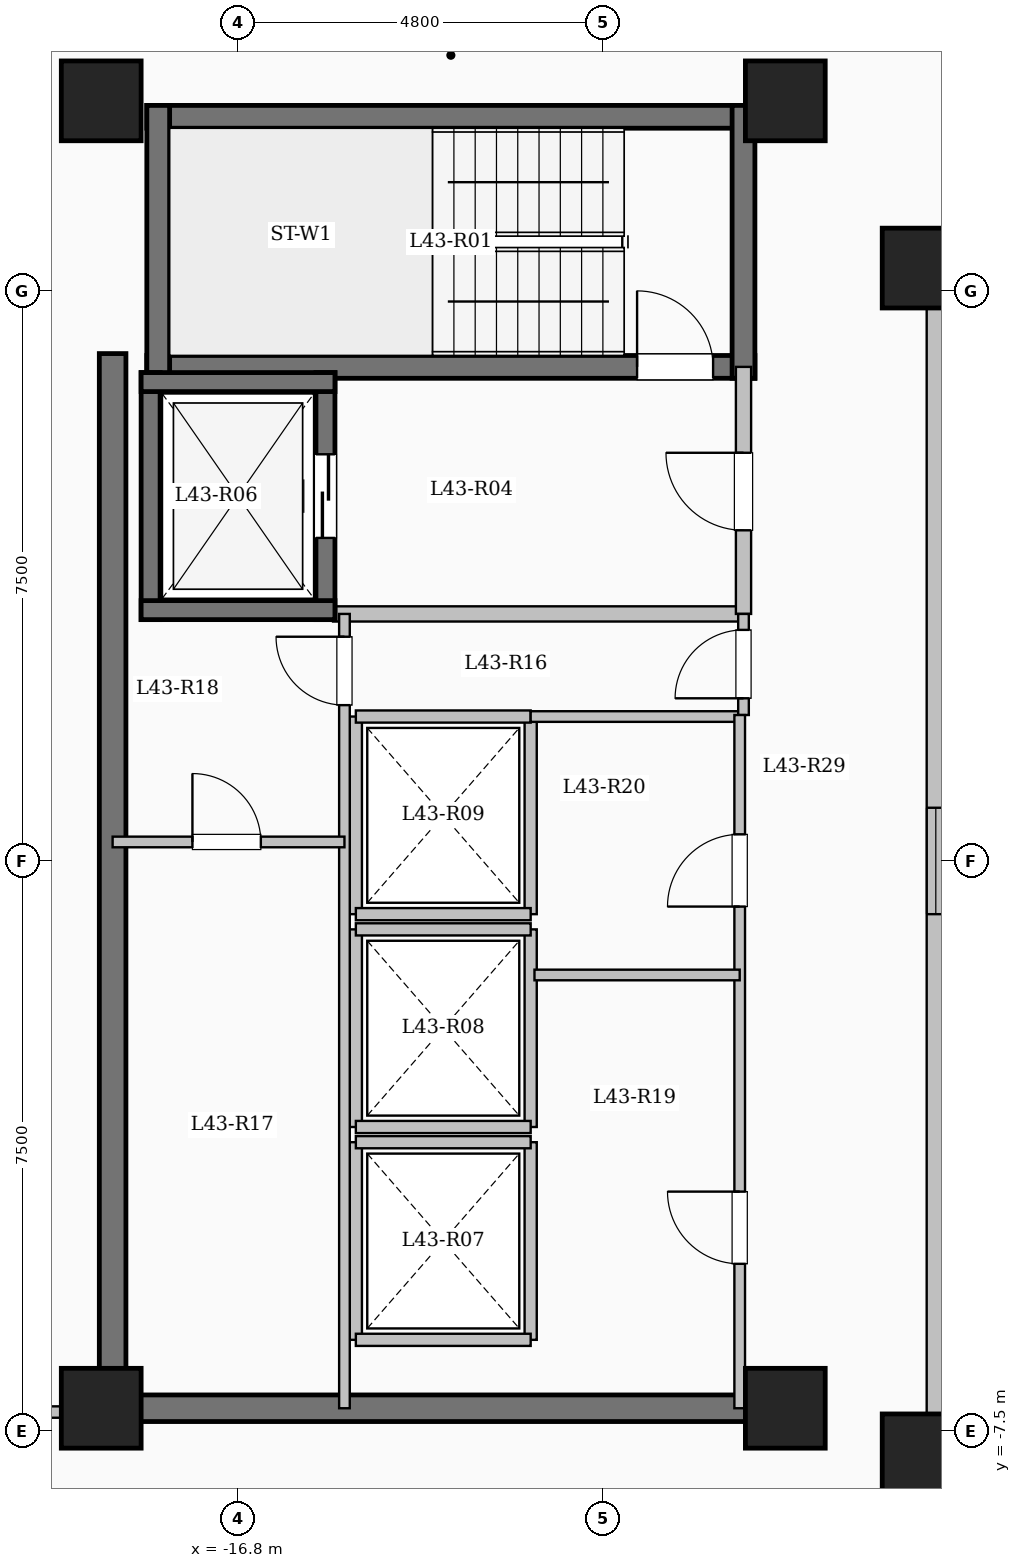
"""IFC4 building model, lengths in metres.
Left out: names, types, materials, properties, quantities, classifications, styles, units other than length and angle.
Written with IfcOpenShell. Run it as: python <this file> out.ifc"""

import sys

from ifc_helpers import new_model, si_unit, direction, frame, frame_2d, origin, origin_2d, place, context, subcontext, project, spatial, rectangle, extrude, element, fill, save


model = new_model("IFC4")
c1 = context("Model", 3, precision=1e-05, world=origin(), true_north=direction((0.0, 1.0)))
c2 = subcontext(c1, "Body", "Model", "MODEL_VIEW")
j1 = project(units=[si_unit("LENGTHUNIT", "METRE"), si_unit("PLANEANGLEUNIT", "RADIAN")], contexts=[c1])
p1 = place(None, origin())
s1 = spatial("IfcSite", under=j1, at=p1, CompositionType="ELEMENT")
p2 = place(p1, origin())
s2 = spatial("IfcBuilding", under=s1, at=p2, CompositionType="ELEMENT")
p3 = place(p2, frame((0.0, 0.0, 159.4)))
s3 = spatial("IfcBuildingStorey", under=s2, at=p3, CompositionType="ELEMENT", Elevation=159.4)
for number, where, z_axis, x_axis in (
    (1, (-7.8, -7.8, 0.0), (0.0, 0.0, 1.0), (1.0, 0.0, 0.0)),
    (2, (-7.8, 7.8, 0.0), (0.0, 0.0, 1.0), (1.0, 0.0, 0.0)),
    (3, (-9.6, -7.2, 0.0), (0.0, 0.0, 1.0), (1.0, 0.0, 0.0)),
    (4, (-9.6, 10.0, 0.0), (0.0, 0.0, 1.0), (1.0, 0.0, 0.0)),
    (5, (-18.6, -7.2, 0.0), (0.0, 0.0, 1.0), (1.0, 0.0, 0.0)),
    (6, (-18.6, 10.0, 0.0), (0.0, 0.0, 1.0), (1.0, 0.0, 0.0)),
):
    element("IfcColumn", number, at=place(p3, frame(where, z_axis=z_axis, x_axis=x_axis)), inside=s3, PredefinedType="COLUMN", context=c2, shape_type="SweptSolid", body=[
        extrude(rectangle(XDim=1.05, YDim=1.05, at=origin_2d()), origin(), (0.0, 0.0, 1.0), 3.35),
    ])
p4 = place(p3, frame((-7.62, -7.62, 0.0), z_axis=(0.0, 0.0, 1.0), x_axis=(1.0, 0.0, 0.0)))
e7 = element("IfcWall", 7, at=p4, inside=s3, PredefinedType="SOLIDWALL", context=c2, shape_type="SweptSolid", body=[
    extrude(rectangle(XDim=15.24, YDim=0.24, at=frame_2d((7.62, 0.0))), origin(), (0.0, 0.0, 1.0), 3.1),
])
p5 = place(p4, frame((6.92, 0.0, 0.95)))
e8 = element("IfcOpeningElement", 8, at=p5, cuts=e7, PredefinedType="OPENING", context=c2, shape_type="SweptSolid", body=[
    extrude(rectangle(XDim=1.4, YDim=1.5, at=frame_2d((0.7, 0.75))), frame((0.0, 0.13, 0.0), z_axis=(0.0, -1.0, 0.0), x_axis=(1.0, 0.0, 0.0)), (0.0, 0.0, 1.0), 0.26),
])
p6 = place(p3, frame((7.62, 7.62, 0.0), z_axis=(0.0, 0.0, 1.0), x_axis=(-1.0, 0.0, 0.0)))
e9 = element("IfcWall", 9, at=p6, inside=s3, PredefinedType="SOLIDWALL", context=c2, shape_type="SweptSolid", body=[
    extrude(rectangle(XDim=15.24, YDim=0.24, at=frame_2d((7.62, 0.0))), origin(), (0.0, 0.0, 1.0), 3.1),
])
p7 = place(p6, frame((6.92, 0.0, 0.95)))
e10 = element("IfcOpeningElement", 10, at=p7, cuts=e9, PredefinedType="OPENING", context=c2, shape_type="SweptSolid", body=[
    extrude(rectangle(XDim=1.4, YDim=1.5, at=frame_2d((0.7, 0.75))), frame((0.0, 0.13, 0.0), z_axis=(0.0, -1.0, 0.0), x_axis=(1.0, 0.0, 0.0)), (0.0, 0.0, 1.0), 0.26),
])
p8 = place(p3, frame((-7.62, 7.62, 0.0), z_axis=(0.0, 0.0, 1.0), x_axis=(0.0, -1.0, 0.0)))
e11 = element("IfcWall", 11, at=p8, inside=s3, PredefinedType="SOLIDWALL", context=c2, shape_type="SweptSolid", body=[
    extrude(rectangle(XDim=15.24, YDim=0.24, at=frame_2d((7.62, 0.0))), origin(), (0.0, 0.0, 1.0), 3.1),
])
p9 = place(p8, frame((6.92, 0.0, 0.95)))
e12 = element("IfcOpeningElement", 12, at=p9, cuts=e11, PredefinedType="OPENING", context=c2, shape_type="SweptSolid", body=[
    extrude(rectangle(XDim=1.4, YDim=1.5, at=frame_2d((0.7, 0.75))), frame((0.0, 0.13, 0.0), z_axis=(0.0, -1.0, 0.0), x_axis=(1.0, 0.0, 0.0)), (0.0, 0.0, 1.0), 0.26),
])
p10 = place(p3, frame((-18.0, 9.79, 0.0), z_axis=(0.0, 0.0, 1.0), x_axis=(1.0, 0.0, 0.0)))
e13 = element("IfcWall", 13, at=p10, inside=s3, PredefinedType="SHEAR", context=c2, shape_type="SweptSolid", body=[
    extrude(rectangle(XDim=8.0, YDim=0.3, at=frame_2d((4.0, 0.0))), origin(), (0.0, 0.0, 1.0), 3.35),
])
p11 = place(p3, frame((-18.0, 6.5, 0.0), z_axis=(0.0, 0.0, 1.0), x_axis=(1.0, 0.0, 0.0)))
e14 = element("IfcWall", 14, at=p11, inside=s3, PredefinedType="SHEAR", context=c2, shape_type="SweptSolid", body=[
    extrude(rectangle(XDim=8.0, YDim=0.3, at=frame_2d((4.0, 0.0))), origin(), (0.0, 0.0, 1.0), 3.35),
])
p12 = place(p11, frame((6.45, 0.0, 0.0)))
e15 = element("IfcOpeningElement", 15, at=p12, cuts=e14, PredefinedType="OPENING", context=c2, shape_type="SweptSolid", body=[
    extrude(rectangle(XDim=1.0, YDim=2.15, at=frame_2d((0.5, 1.075))), frame((0.0, 0.16, 0.0), z_axis=(0.0, -1.0, 0.0), x_axis=(1.0, 0.0, 0.0)), (0.0, 0.0, 1.0), 0.32),
])
for number, where, z_axis, x_axis in (
    (16, (-17.85, 6.35, 0.0), (0.0, 0.0, 1.0), (0.0, 1.0, 0.0)),
    (17, (-10.15, 6.35, 0.0), (0.0, 0.0, 1.0), (0.0, 1.0, 0.0)),
):
    element("IfcWall", number, at=place(p3, frame(where, z_axis=z_axis, x_axis=x_axis)), inside=s3, PredefinedType="SHEAR", context=c2, shape_type="SweptSolid", body=[
        extrude(rectangle(XDim=3.59, YDim=0.3, at=frame_2d((1.795, 0.0))), origin(), (0.0, 0.0, 1.0), 3.35),
    ])
p13 = place(p3, frame((-15.55, 3.25, 0.0), z_axis=(0.0, 0.0, 1.0), x_axis=(1.0, 0.0, 0.0)))
e18 = element("IfcWall", 18, at=p13, inside=s3, PredefinedType="SOLIDWALL", context=c2, shape_type="SweptSolid", body=[
    extrude(rectangle(XDim=5.4, YDim=0.2, at=frame_2d((2.7, 0.0))), origin(), (0.0, 0.0, 1.0), 3.1),
])
p14 = place(p3, frame((-10.15, 3.25, 0.0), z_axis=(0.0, 0.0, 1.0), x_axis=(0.0, 1.0, 0.0)))
e19 = element("IfcWall", 19, at=p14, inside=s3, PredefinedType="SOLIDWALL", context=c2, shape_type="SweptSolid", body=[
    extrude(rectangle(XDim=3.25, YDim=0.2, at=frame_2d((1.625, 0.0))), origin(), (0.0, 0.0, 1.0), 3.1),
])
p15 = place(p14, frame((1.1, 0.0, 0.0)))
e20 = element("IfcOpeningElement", 20, at=p15, cuts=e19, PredefinedType="OPENING", context=c2, shape_type="SweptSolid", body=[
    extrude(rectangle(XDim=1.02, YDim=2.15, at=frame_2d((0.51, 1.075))), frame((0.0, 0.11, 0.0), z_axis=(0.0, -1.0, 0.0), x_axis=(1.0, 0.0, 0.0)), (0.0, 0.0, 1.0), 0.22),
])
p16 = place(p3, frame((-17.95, 3.175, 0.0), z_axis=(0.0, 0.0, 1.0), x_axis=(0.0, 1.0, 0.0)))
e21 = element("IfcWall", 21, at=p16, inside=s3, PredefinedType="SHEAR", context=c2, shape_type="SweptSolid", body=[
    extrude(rectangle(XDim=3.25, YDim=0.25, at=frame_2d((1.625, 0.0))), origin(), (0.0, 0.0, 1.0), 3.35),
])
p17 = place(p3, frame((-15.65, 3.175, 0.0), z_axis=(0.0, 0.0, 1.0), x_axis=(0.0, 1.0, 0.0)))
e22 = element("IfcWall", 22, at=p17, inside=s3, PredefinedType="SHEAR", context=c2, shape_type="SweptSolid", body=[
    extrude(rectangle(XDim=3.25, YDim=0.25, at=frame_2d((1.625, 0.0))), origin(), (0.0, 0.0, 1.0), 3.35),
])
p18 = place(p17, frame((1.075, 0.0, 0.0)))
e23 = element("IfcOpeningElement", 23, at=p18, cuts=e22, PredefinedType="OPENING", context=c2, shape_type="SweptSolid", body=[
    extrude(rectangle(XDim=1.1, YDim=2.15, at=frame_2d((0.55, 1.075))), frame((0.0, 0.135, 0.0), z_axis=(0.0, -1.0, 0.0), x_axis=(1.0, 0.0, 0.0)), (0.0, 0.0, 1.0), 0.27),
])
for number, where, z_axis, x_axis in (
    (24, (-18.075, 3.3, 0.0), (0.0, 0.0, 1.0), (1.0, 0.0, 0.0)),
    (25, (-18.075, 6.3, 0.0), (0.0, 0.0, 1.0), (1.0, 0.0, 0.0)),
):
    element("IfcWall", number, at=place(p3, frame(where, z_axis=z_axis, x_axis=x_axis)), inside=s3, PredefinedType="SHEAR", context=c2, shape_type="SweptSolid", body=[
        extrude(rectangle(XDim=2.55, YDim=0.25, at=frame_2d((1.275, 0.0))), origin(), (0.0, 0.0, 1.0), 3.35),
    ])
for number, where, z_axis, x_axis in (
    (26, (-15.25, -6.3, 0.0), (0.0, 0.0, 1.0), (0.0, 1.0, 0.0)),
    (27, (-12.95, -6.3, 0.0), (0.0, 0.0, 1.0), (0.0, 1.0, 0.0)),
):
    element("IfcWall", number, at=place(p3, frame(where, z_axis=z_axis, x_axis=x_axis)), inside=s3, PredefinedType="SOLIDWALL", context=c2, shape_type="SweptSolid", body=[
        extrude(rectangle(XDim=2.6, YDim=0.16, at=frame_2d((1.3, 0.0))), origin(), (0.0, 0.0, 1.0), 3.1),
    ])
for number, where, z_axis, x_axis in (
    (28, (-15.25, -6.3, 0.0), (0.0, 0.0, 1.0), (1.0, 0.0, 0.0)),
    (29, (-15.25, -3.7, 0.0), (0.0, 0.0, 1.0), (1.0, 0.0, 0.0)),
):
    element("IfcWall", number, at=place(p3, frame(where, z_axis=z_axis, x_axis=x_axis)), inside=s3, PredefinedType="SOLIDWALL", context=c2, shape_type="SweptSolid", body=[
        extrude(rectangle(XDim=2.3, YDim=0.16, at=frame_2d((1.15, 0.0))), origin(), (0.0, 0.0, 1.0), 3.1),
    ])
for number, where, z_axis, x_axis in (
    (30, (-15.25, -3.5, 0.0), (0.0, 0.0, 1.0), (0.0, 1.0, 0.0)),
    (31, (-12.95, -3.5, 0.0), (0.0, 0.0, 1.0), (0.0, 1.0, 0.0)),
):
    element("IfcWall", number, at=place(p3, frame(where, z_axis=z_axis, x_axis=x_axis)), inside=s3, PredefinedType="SOLIDWALL", context=c2, shape_type="SweptSolid", body=[
        extrude(rectangle(XDim=2.6, YDim=0.16, at=frame_2d((1.3, 0.0))), origin(), (0.0, 0.0, 1.0), 3.1),
    ])
for number, where, z_axis, x_axis in (
    (32, (-15.25, -3.5, 0.0), (0.0, 0.0, 1.0), (1.0, 0.0, 0.0)),
    (33, (-15.25, -0.9, 0.0), (0.0, 0.0, 1.0), (1.0, 0.0, 0.0)),
):
    element("IfcWall", number, at=place(p3, frame(where, z_axis=z_axis, x_axis=x_axis)), inside=s3, PredefinedType="SOLIDWALL", context=c2, shape_type="SweptSolid", body=[
        extrude(rectangle(XDim=2.3, YDim=0.16, at=frame_2d((1.15, 0.0))), origin(), (0.0, 0.0, 1.0), 3.1),
    ])
for number, where, z_axis, x_axis in (
    (34, (-15.25, -0.7, 0.0), (0.0, 0.0, 1.0), (0.0, 1.0, 0.0)),
    (35, (-12.95, -0.7, 0.0), (0.0, 0.0, 1.0), (0.0, 1.0, 0.0)),
):
    element("IfcWall", number, at=place(p3, frame(where, z_axis=z_axis, x_axis=x_axis)), inside=s3, PredefinedType="SOLIDWALL", context=c2, shape_type="SweptSolid", body=[
        extrude(rectangle(XDim=2.6, YDim=0.16, at=frame_2d((1.3, 0.0))), origin(), (0.0, 0.0, 1.0), 3.1),
    ])
for number, where, z_axis, x_axis in (
    (36, (-15.25, -0.7, 0.0), (0.0, 0.0, 1.0), (1.0, 0.0, 0.0)),
    (37, (-15.25, 1.9, 0.0), (0.0, 0.0, 1.0), (1.0, 0.0, 0.0)),
):
    element("IfcWall", number, at=place(p3, frame(where, z_axis=z_axis, x_axis=x_axis)), inside=s3, PredefinedType="SOLIDWALL", context=c2, shape_type="SweptSolid", body=[
        extrude(rectangle(XDim=2.3, YDim=0.16, at=frame_2d((1.15, 0.0))), origin(), (0.0, 0.0, 1.0), 3.1),
    ])
p19 = place(p3, frame((-18.45, -7.375, 0.0), z_axis=(0.0, 0.0, 1.0), x_axis=(0.0, 1.0, 0.0)))
e38 = element("IfcWall", 38, at=p19, inside=s3, PredefinedType="SHEAR", context=c2, shape_type="SweptSolid", body=[
    extrude(rectangle(XDim=14.05, YDim=0.35, at=frame_2d((7.025, 0.0))), origin(), (0.0, 0.0, 1.0), 3.35),
])
p20 = place(p3, frame((-18.625, -7.2, 0.0), z_axis=(0.0, 0.0, 1.0), x_axis=(1.0, 0.0, 0.0)))
e39 = element("IfcWall", 39, at=p20, inside=s3, PredefinedType="SHEAR", context=c2, shape_type="SweptSolid", body=[
    extrude(rectangle(XDim=8.55, YDim=0.35, at=frame_2d((4.275, 0.0))), origin(), (0.0, 0.0, 1.0), 3.35),
])
p21 = place(p3, frame((-12.95, 1.9, 0.0), z_axis=(0.0, 0.0, 1.0), x_axis=(1.0, 0.0, 0.0)))
e40 = element("IfcWall", 40, at=p21, inside=s3, PredefinedType="PARTITIONING", context=c2, shape_type="SweptSolid", body=[
    extrude(rectangle(XDim=2.8, YDim=0.14, at=frame_2d((1.4, 0.0))), origin(), (0.0, 0.0, 1.0), 3.1),
])
p22 = place(p3, frame((-10.15, 1.92, 0.0), z_axis=(0.0, 0.0, 1.0), x_axis=(0.0, 1.0, 0.0)))
e41 = element("IfcWall", 41, at=p22, inside=s3, PredefinedType="PARTITIONING", context=c2, shape_type="SweptSolid", body=[
    extrude(rectangle(XDim=1.33, YDim=0.14, at=frame_2d((0.665, 0.0))), origin(), (0.0, 0.0, 1.0), 3.1),
])
p23 = place(p22, frame((0.22, 0.0, 0.0)))
e42 = element("IfcOpeningElement", 42, at=p23, cuts=e41, PredefinedType="OPENING", context=c2, shape_type="SweptSolid", body=[
    extrude(rectangle(XDim=0.9, YDim=2.08, at=frame_2d((0.45, 1.04))), frame((0.0, 0.08, 0.0), z_axis=(0.0, -1.0, 0.0), x_axis=(1.0, 0.0, 0.0)), (0.0, 0.0, 1.0), 0.16),
])
p24 = place(p3, frame((-15.4, -7.2, 0.0), z_axis=(0.0, 0.0, 1.0), x_axis=(0.0, 1.0, 0.0)))
e43 = element("IfcWall", 43, at=p24, inside=s3, PredefinedType="PARTITIONING", context=c2, shape_type="SweptSolid", body=[
    extrude(rectangle(XDim=10.45, YDim=0.14, at=frame_2d((5.225, 0.0))), origin(), (0.0, 0.0, 1.0), 3.1),
])
p25 = place(p24, frame((9.25, 0.0, 0.0)))
e44 = element("IfcOpeningElement", 44, at=p25, cuts=e43, PredefinedType="OPENING", context=c2, shape_type="SweptSolid", body=[
    extrude(rectangle(XDim=0.9, YDim=2.08, at=frame_2d((0.45, 1.04))), frame((0.0, 0.08, 0.0), z_axis=(0.0, -1.0, 0.0), x_axis=(1.0, 0.0, 0.0)), (0.0, 0.0, 1.0), 0.16),
])
p26 = place(p3, frame((-18.45, 0.25, 0.0), z_axis=(0.0, 0.0, 1.0), x_axis=(1.0, 0.0, 0.0)))
e45 = element("IfcWall", 45, at=p26, inside=s3, PredefinedType="PARTITIONING", context=c2, shape_type="SweptSolid", body=[
    extrude(rectangle(XDim=3.05, YDim=0.14, at=frame_2d((1.525, 0.0))), origin(), (0.0, 0.0, 1.0), 3.1),
])
p27 = place(p26, frame((1.05, 0.0, 0.0)))
e46 = element("IfcOpeningElement", 46, at=p27, cuts=e45, PredefinedType="OPENING", context=c2, shape_type="SweptSolid", body=[
    extrude(rectangle(XDim=0.9, YDim=2.08, at=frame_2d((0.45, 1.04))), frame((0.0, 0.08, 0.0), z_axis=(0.0, -1.0, 0.0), x_axis=(1.0, 0.0, 0.0)), (0.0, 0.0, 1.0), 0.16),
])
p28 = place(p3, frame((-10.2, -7.2, 0.0), z_axis=(0.0, 0.0, 1.0), x_axis=(0.0, 1.0, 0.0)))
e47 = element("IfcWall", 47, at=p28, inside=s3, PredefinedType="PARTITIONING", context=c2, shape_type="SweptSolid", body=[
    extrude(rectangle(XDim=9.12, YDim=0.14, at=frame_2d((4.56, 0.0))), origin(), (0.0, 0.0, 1.0), 3.1),
])
p29 = place(p28, frame((1.9, 0.0, 0.0)))
e48 = element("IfcOpeningElement", 48, at=p29, cuts=e47, PredefinedType="OPENING", context=c2, shape_type="SweptSolid", body=[
    extrude(rectangle(XDim=0.95, YDim=2.12, at=frame_2d((0.475, 1.06))), frame((0.0, 0.08, 0.0), z_axis=(0.0, -1.0, 0.0), x_axis=(1.0, 0.0, 0.0)), (0.0, 0.0, 1.0), 0.16),
])
p30 = place(p28, frame((6.6, 0.0, 0.0)))
e49 = element("IfcOpeningElement", 49, at=p30, cuts=e47, PredefinedType="OPENING", context=c2, shape_type="SweptSolid", body=[
    extrude(rectangle(XDim=0.95, YDim=2.12, at=frame_2d((0.475, 1.06))), frame((0.0, 0.08, 0.0), z_axis=(0.0, -1.0, 0.0), x_axis=(1.0, 0.0, 0.0)), (0.0, 0.0, 1.0), 0.16),
])
p31 = place(p3, frame((-12.9, -1.5, 0.0), z_axis=(0.0, 0.0, 1.0), x_axis=(1.0, 0.0, 0.0)))
e50 = element("IfcWall", 50, at=p31, inside=s3, PredefinedType="PARTITIONING", context=c2, shape_type="SweptSolid", body=[
    extrude(rectangle(XDim=2.7, YDim=0.14, at=frame_2d((1.35, 0.0))), origin(), (0.0, 0.0, 1.0), 3.1),
])
p32 = place(p3, frame((-25.08, -7.25, 0.0), z_axis=(0.0, 0.0, 1.0), x_axis=(1.0, 0.0, 0.0)))
e51 = element("IfcWall", 51, at=p32, inside=s3, PredefinedType="PARTITIONING", context=c2, shape_type="SweptSolid", body=[
    extrude(rectangle(XDim=6.63, YDim=0.15, at=frame_2d((3.315, 0.0))), origin(), (0.0, 0.0, 1.0), 3.1),
])
p33 = place(p32, frame((3.58, 0.0, 0.0)))
e52 = element("IfcOpeningElement", 52, at=p33, cuts=e51, PredefinedType="OPENING", context=c2, shape_type="SweptSolid", body=[
    extrude(rectangle(XDim=1.08, YDim=2.15, at=frame_2d((0.54, 1.075))), frame((0.0, 0.085, 0.0), z_axis=(0.0, -1.0, 0.0), x_axis=(1.0, 0.0, 0.0)), (0.0, 0.0, 1.0), 0.17),
])
p34 = place(p9, origin())
e53 = element("IfcWindow", 53, at=p34, inside=s3, PartitioningType="SINGLE_PANEL", PredefinedType="WINDOW", context=c2, shape_type="SweptSolid", body=[
    extrude(rectangle(XDim=1.4, YDim=1.5, at=frame_2d((0.7, 0.75))), frame((0.0, 0.03, 0.0), z_axis=(0.0, -1.0, 0.0), x_axis=(1.0, 0.0, 0.0)), (0.0, 0.0, 1.0), 0.06),
])
fill(e12, e53)
p35 = place(p12, origin())
e54 = element("IfcDoor", 54, at=p35, inside=s3, OperationType="SINGLE_SWING_LEFT", PredefinedType="DOOR", context=c2, shape_type="SweptSolid", body=[
    extrude(rectangle(XDim=1.0, YDim=2.15, at=frame_2d((0.5, 1.075))), frame((0.0, 0.025, 0.0), z_axis=(0.0, -1.0, 0.0), x_axis=(1.0, 0.0, 0.0)), (0.0, 0.0, 1.0), 0.05),
])
fill(e15, e54)
p36 = place(p15, origin())
e55 = element("IfcDoor", 55, at=p36, inside=s3, OperationType="SINGLE_SWING_RIGHT", PredefinedType="DOOR", context=c2, shape_type="SweptSolid", body=[
    extrude(rectangle(XDim=1.02, YDim=2.15, at=frame_2d((0.51, 1.075))), frame((0.0, 0.025, 0.0), z_axis=(0.0, -1.0, 0.0), x_axis=(1.0, 0.0, 0.0)), (0.0, 0.0, 1.0), 0.05),
])
fill(e20, e55)
p37 = place(p18, origin())
e56 = element("IfcDoor", 56, at=p37, inside=s3, OperationType="SLIDING_TO_LEFT", PredefinedType="DOOR", context=c2, shape_type="SweptSolid", body=[
    extrude(rectangle(XDim=1.1, YDim=2.15, at=frame_2d((0.55, 1.075))), frame((0.0, 0.025, 0.0), z_axis=(0.0, -1.0, 0.0), x_axis=(1.0, 0.0, 0.0)), (0.0, 0.0, 1.0), 0.05),
])
fill(e23, e56)
p38 = place(p23, origin())
e57 = element("IfcDoor", 57, at=p38, inside=s3, OperationType="SINGLE_SWING_LEFT", PredefinedType="DOOR", context=c2, shape_type="SweptSolid", body=[
    extrude(rectangle(XDim=0.9, YDim=2.08, at=frame_2d((0.45, 1.04))), frame((0.0, 0.025, 0.0), z_axis=(0.0, -1.0, 0.0), x_axis=(1.0, 0.0, 0.0)), (0.0, 0.0, 1.0), 0.05),
])
fill(e42, e57)
p39 = place(p25, origin())
e58 = element("IfcDoor", 58, at=p39, inside=s3, OperationType="SINGLE_SWING_RIGHT", PredefinedType="DOOR", context=c2, shape_type="SweptSolid", body=[
    extrude(rectangle(XDim=0.9, YDim=2.08, at=frame_2d((0.45, 1.04))), frame((0.0, 0.025, 0.0), z_axis=(0.0, -1.0, 0.0), x_axis=(1.0, 0.0, 0.0)), (0.0, 0.0, 1.0), 0.05),
])
fill(e44, e58)
p40 = place(p27, origin())
e59 = element("IfcDoor", 59, at=p40, inside=s3, OperationType="SINGLE_SWING_LEFT", PredefinedType="DOOR", context=c2, shape_type="SweptSolid", body=[
    extrude(rectangle(XDim=0.9, YDim=2.08, at=frame_2d((0.45, 1.04))), frame((0.0, 0.025, 0.0), z_axis=(0.0, -1.0, 0.0), x_axis=(1.0, 0.0, 0.0)), (0.0, 0.0, 1.0), 0.05),
])
fill(e46, e59)
p41 = place(p29, origin())
e60 = element("IfcDoor", 60, at=p41, inside=s3, OperationType="SINGLE_SWING_RIGHT", PredefinedType="DOOR", context=c2, shape_type="SweptSolid", body=[
    extrude(rectangle(XDim=0.95, YDim=2.12, at=frame_2d((0.475, 1.06))), frame((0.0, 0.025, 0.0), z_axis=(0.0, -1.0, 0.0), x_axis=(1.0, 0.0, 0.0)), (0.0, 0.0, 1.0), 0.05),
])
fill(e48, e60)
p42 = place(p30, origin())
e61 = element("IfcDoor", 61, at=p42, inside=s3, OperationType="SINGLE_SWING_LEFT", PredefinedType="DOOR", context=c2, shape_type="SweptSolid", body=[
    extrude(rectangle(XDim=0.95, YDim=2.12, at=frame_2d((0.475, 1.06))), frame((0.0, 0.025, 0.0), z_axis=(0.0, -1.0, 0.0), x_axis=(1.0, 0.0, 0.0)), (0.0, 0.0, 1.0), 0.05),
])
fill(e49, e61)
save(model, sys.argv[1])
